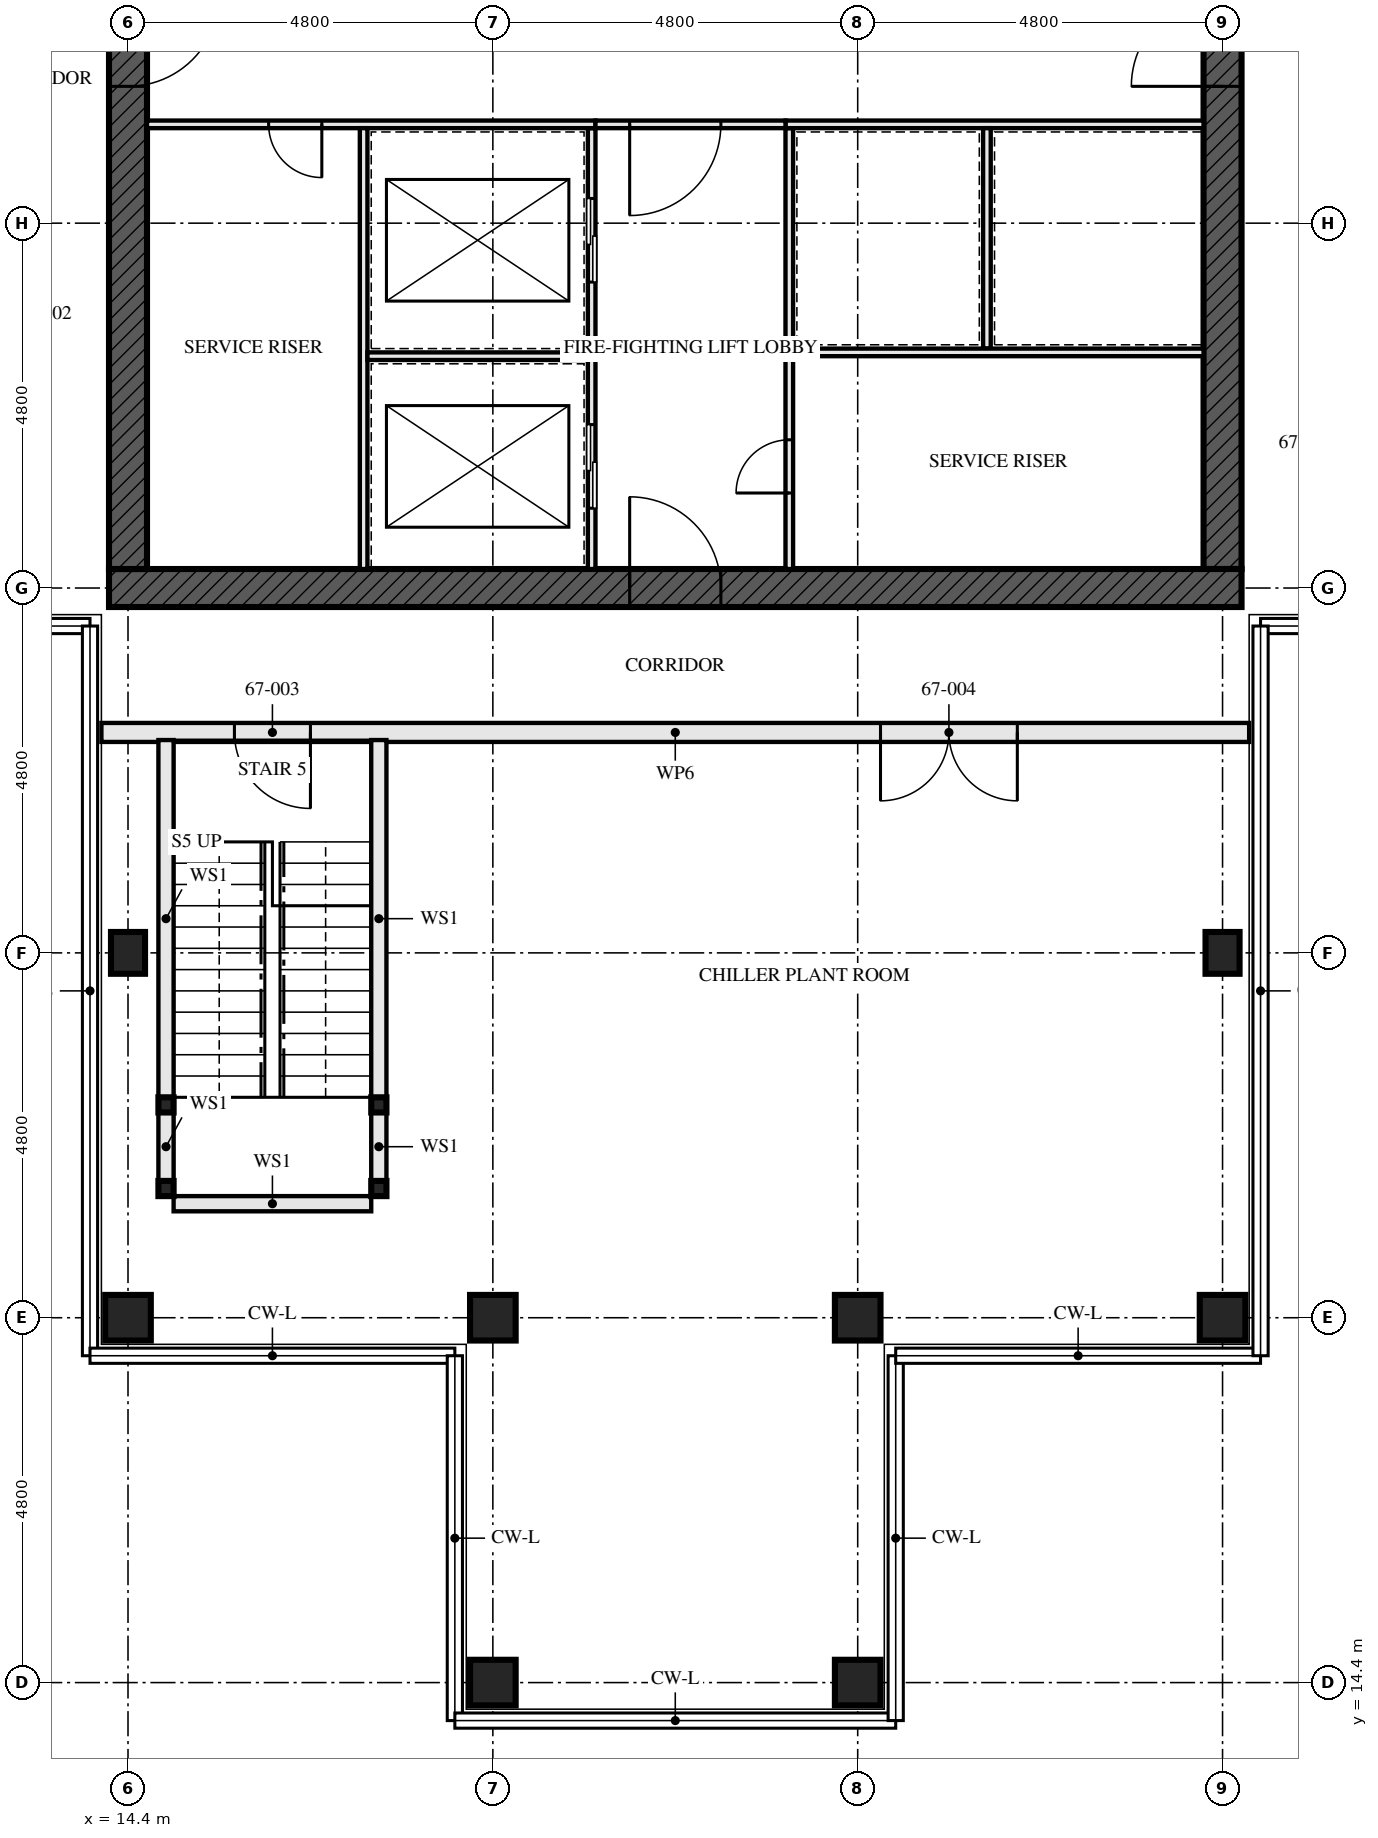
"""IFC4 building model, lengths in metres.
Left out: names, types, materials, properties, quantities, classifications, styles, units other than length and angle.
Written with IfcOpenShell. Run it as: python <this file> out.ifc"""

import sys

from ifc_helpers import new_model, si_unit, direction, frame, frame_2d, origin, origin_2d, place, context, subcontext, project, spatial, rectangle, hollow_rectangle, i_section, extrude, element, fill, save


model = new_model("IFC4")
c1 = context("Model", 3, precision=1e-05, world=origin(), true_north=direction((0.0, 1.0)))
c2 = subcontext(c1, "Body", "Model", "MODEL_VIEW")
j1 = project(units=[si_unit("LENGTHUNIT", "METRE"), si_unit("PLANEANGLEUNIT", "RADIAN")], contexts=[c1])
p1 = place(None, origin())
s1 = spatial("IfcSite", under=j1, at=p1, CompositionType="ELEMENT")
p2 = place(p1, origin())
s2 = spatial("IfcBuilding", under=s1, at=p2, CompositionType="ELEMENT")
p3 = place(p2, frame((0.0, 0.0, 243.5)))
s3 = spatial("IfcBuildingStorey", under=s2, at=p3, CompositionType="ELEMENT", Elevation=243.5)
p4 = place(p3, frame((14.4, 19.2, 0.0), z_axis=(0.0, 0.0, 1.0), x_axis=(0.0, 1.0, 0.0)))
e1 = element("IfcColumn", 1, at=p4, inside=s3, PredefinedType="COLUMN", context=c2, shape_type="SweptSolid", body=[
    extrude(hollow_rectangle(XDim=0.6, YDim=0.6, WallThickness=0.05, at=origin_2d()), origin(), (0.0, 0.0, 1.0), 4.5),
])
p5 = place(p3, frame((14.4, 24.0, 0.0), z_axis=(0.0, 0.0, 1.0), x_axis=(1.0, 0.0, 0.0)))
e2 = element("IfcColumn", 2, at=p5, inside=s3, PredefinedType="COLUMN", context=c2, shape_type="SweptSolid", body=[
    extrude(i_section(OverallWidth=0.448, OverallDepth=0.55, WebThickness=0.072, FlangeThickness=0.115, FilletRadius=0.015, at=origin_2d()), origin(), (0.0, 0.0, 1.0), 4.5),
])
for number, where, z_axis, x_axis in (
    (3, (19.2, 14.4, 0.0), (0.0, 0.0, 1.0), (0.0, 1.0, 0.0)),
    (4, (19.2, 19.2, 0.0), (0.0, 0.0, 1.0), (0.0, 1.0, 0.0)),
    (5, (24.0, 14.4, 0.0), (0.0, 0.0, 1.0), (0.0, 1.0, 0.0)),
    (6, (24.0, 19.2, 0.0), (0.0, 0.0, 1.0), (0.0, 1.0, 0.0)),
    (7, (28.8, 19.2, 0.0), (0.0, 0.0, 1.0), (0.0, 1.0, 0.0)),
):
    element("IfcColumn", number, at=place(p3, frame(where, z_axis=z_axis, x_axis=x_axis)), inside=s3, PredefinedType="COLUMN", context=c2, shape_type="SweptSolid", body=[
        extrude(hollow_rectangle(XDim=0.6, YDim=0.6, WallThickness=0.05, at=origin_2d()), origin(), (0.0, 0.0, 1.0), 4.5),
    ])
p6 = place(p3, frame((28.8, 24.0, 0.0), z_axis=(0.0, 0.0, 1.0), x_axis=(1.0, 0.0, 0.0)))
e8 = element("IfcColumn", 8, at=p6, inside=s3, PredefinedType="COLUMN", context=c2, shape_type="SweptSolid", body=[
    extrude(i_section(OverallWidth=0.448, OverallDepth=0.55, WebThickness=0.072, FlangeThickness=0.115, FilletRadius=0.015, at=origin_2d()), origin(), (0.0, 0.0, 1.0), 4.5),
])
p7 = place(p3, frame((14.15, 28.8, -0.25), z_axis=(0.0, 0.0, 1.0), x_axis=(1.0, 0.0, 0.0)))
e9 = element("IfcWall", 9, at=p7, inside=s3, PredefinedType="SHEAR", context=c2, shape_type="SweptSolid", body=[
    extrude(rectangle(XDim=14.9, YDim=0.5, at=frame_2d((7.45, 0.0))), origin(), (0.0, 0.0, 1.0), 4.5),
])
p8 = place(p7, frame((6.85, 0.0, 0.25)))
e10 = element("IfcOpeningElement", 10, at=p8, cuts=e9, PredefinedType="OPENING", context=c2, shape_type="SweptSolid", body=[
    extrude(rectangle(XDim=1.2, YDim=2.1, at=frame_2d((0.6, 1.05))), frame((0.0, 0.26, 0.0), z_axis=(0.0, -1.0, 0.0), x_axis=(1.0, 0.0, 0.0)), (0.0, 0.0, 1.0), 0.521),
])
p9 = place(p3, frame((14.4, 42.95, -0.25), z_axis=(0.0, 0.0, 1.0), x_axis=(0.0, -1.0, 0.0)))
e11 = element("IfcWall", 11, at=p9, inside=s3, PredefinedType="SHEAR", context=c2, shape_type="SweptSolid", body=[
    extrude(rectangle(XDim=13.9, YDim=0.5, at=frame_2d((6.95, 0.0))), origin(), (0.0, 0.0, 1.0), 4.5),
])
p10 = place(p9, frame((6.35, 0.0, 0.25)))
e12 = element("IfcOpeningElement", 12, at=p10, cuts=e11, PredefinedType="OPENING", context=c2, shape_type="SweptSolid", body=[
    extrude(rectangle(XDim=1.2, YDim=2.1, at=frame_2d((0.6, 1.05))), frame((0.0, 0.26, 0.0), z_axis=(0.0, -1.0, 0.0), x_axis=(1.0, 0.0, 0.0)), (0.0, 0.0, 1.0), 0.521),
])
p11 = place(p3, frame((28.8, 29.05, -0.25), z_axis=(0.0, 0.0, 1.0), x_axis=(0.0, 1.0, 0.0)))
e13 = element("IfcWall", 13, at=p11, inside=s3, PredefinedType="SHEAR", context=c2, shape_type="SweptSolid", body=[
    extrude(rectangle(XDim=13.9, YDim=0.5, at=frame_2d((6.95, 0.0))), origin(), (0.0, 0.0, 1.0), 4.5),
])
p12 = place(p11, frame((6.35, 0.0, 0.25)))
e14 = element("IfcOpeningElement", 14, at=p12, cuts=e13, PredefinedType="OPENING", context=c2, shape_type="SweptSolid", body=[
    extrude(rectangle(XDim=1.2, YDim=2.1, at=frame_2d((0.6, 1.05))), frame((0.0, 0.26, 0.0), z_axis=(0.0, -1.0, 0.0), x_axis=(1.0, 0.0, 0.0)), (0.0, 0.0, 1.0), 0.521),
])
for number, where, z_axis, x_axis in (
    (15, (14.9, 20.9, 0.0), (0.0, 0.0, 1.0), (1.0, 0.0, 0.0)),
    (16, (17.7, 20.9, 0.0), (0.0, 0.0, 1.0), (1.0, 0.0, 0.0)),
    (17, (14.9, 22.0, 0.0), (0.0, 0.0, 1.0), (1.0, 0.0, 0.0)),
    (18, (17.7, 22.0, 0.0), (0.0, 0.0, 1.0), (1.0, 0.0, 0.0)),
):
    element("IfcColumn", number, at=place(p3, frame(where, z_axis=z_axis, x_axis=x_axis)), inside=s3, PredefinedType="COLUMN", context=c2, shape_type="SweptSolid", body=[
        extrude(hollow_rectangle(XDim=0.2, YDim=0.2, WallThickness=0.008, at=origin_2d()), origin(), (0.0, 0.0, 1.0), 4.25),
    ])
p13 = place(p3, frame((14.9, 21.0, 0.0), z_axis=(0.0, 0.0, 1.0), x_axis=(0.0, 1.0, 0.0)))
e19 = element("IfcWall", 19, at=p13, inside=s3, PredefinedType="SOLIDWALL", context=c2, shape_type="SweptSolid", body=[
    extrude(rectangle(XDim=0.9, YDim=0.2, at=frame_2d((0.45, 0.0))), origin(), (0.0, 0.0, 1.0), 4.25),
])
p14 = place(p3, frame((14.9, 22.1, 0.0), z_axis=(0.0, 0.0, 1.0), x_axis=(0.0, 1.0, 0.0)))
e20 = element("IfcWall", 20, at=p14, inside=s3, PredefinedType="SOLIDWALL", context=c2, shape_type="SweptSolid", body=[
    extrude(rectangle(XDim=4.7, YDim=0.2, at=frame_2d((2.35, 0.0))), origin(), (0.0, 0.0, 1.0), 4.25),
])
p15 = place(p3, frame((17.7, 21.0, 0.0), z_axis=(0.0, 0.0, 1.0), x_axis=(0.0, 1.0, 0.0)))
e21 = element("IfcWall", 21, at=p15, inside=s3, PredefinedType="SOLIDWALL", context=c2, shape_type="SweptSolid", body=[
    extrude(rectangle(XDim=0.9, YDim=0.2, at=frame_2d((0.45, 0.0))), origin(), (0.0, 0.0, 1.0), 4.25),
])
p16 = place(p3, frame((17.7, 22.1, 0.0), z_axis=(0.0, 0.0, 1.0), x_axis=(0.0, 1.0, 0.0)))
e22 = element("IfcWall", 22, at=p16, inside=s3, PredefinedType="SOLIDWALL", context=c2, shape_type="SweptSolid", body=[
    extrude(rectangle(XDim=4.7, YDim=0.2, at=frame_2d((2.35, 0.0))), origin(), (0.0, 0.0, 1.0), 4.25),
])
p17 = place(p3, frame((15.0, 20.7, 0.0), z_axis=(0.0, 0.0, 1.0), x_axis=(1.0, 0.0, 0.0)))
e23 = element("IfcWall", 23, at=p17, inside=s3, PredefinedType="SOLIDWALL", context=c2, shape_type="SweptSolid", body=[
    extrude(rectangle(XDim=2.6, YDim=0.2, at=frame_2d((1.3, 0.0))), origin(), (0.0, 0.0, 1.0), 4.25),
])
p18 = place(p3, frame((14.05, 26.9, 0.0), z_axis=(0.0, 0.0, 1.0), x_axis=(1.0, 0.0, 0.0)))
e24 = element("IfcWall", 24, at=p18, inside=s3, PredefinedType="SOLIDWALL", context=c2, shape_type="SweptSolid", body=[
    extrude(rectangle(XDim=15.1, YDim=0.25, at=frame_2d((7.55, 0.0))), origin(), (0.0, 0.0, 1.0), 3.04),
])
p19 = place(p18, frame((1.75, 0.0, 0.0)))
e25 = element("IfcOpeningElement", 25, at=p19, cuts=e24, PredefinedType="OPENING", context=c2, shape_type="SweptSolid", body=[
    extrude(rectangle(XDim=1.0, YDim=2.1, at=frame_2d((0.5, 1.05))), frame((0.0, 0.135, 0.0), z_axis=(0.0, -1.0, 0.0), x_axis=(1.0, 0.0, 0.0)), (0.0, 0.0, 1.0), 0.271),
])
p20 = place(p18, frame((10.25, 0.0, 0.0)))
e26 = element("IfcOpeningElement", 26, at=p20, cuts=e24, PredefinedType="OPENING", context=c2, shape_type="SweptSolid", body=[
    extrude(rectangle(XDim=1.8, YDim=2.4, at=frame_2d((0.9, 1.2))), frame((0.0, 0.135, 0.0), z_axis=(0.0, -1.0, 0.0), x_axis=(1.0, 0.0, 0.0)), (0.0, 0.0, 1.0), 0.271),
])
p21 = place(p3, frame((20.5, 29.05, 0.0), z_axis=(0.0, 0.0, 1.0), x_axis=(0.0, 1.0, 0.0)))
e27 = element("IfcWall", 27, at=p21, inside=s3, PredefinedType="SOLIDWALL", context=c2, shape_type="SweptSolid", body=[
    extrude(rectangle(XDim=5.8, YDim=0.1, at=frame_2d((2.9, 0.0))), origin(), (0.0, 0.0, 1.0), 4.25),
])
p22 = place(p21, frame((0.8, 0.0, 0.0)))
e28 = element("IfcOpeningElement", 28, at=p22, cuts=e27, PredefinedType="OPENING", context=c2, shape_type="SweptSolid", body=[
    extrude(rectangle(XDim=1.1, YDim=2.3, at=frame_2d((0.55, 1.15))), frame((0.0, 0.061, 0.0), z_axis=(0.0, -1.0, 0.0), x_axis=(1.0, 0.0, 0.0)), (0.0, 0.0, 1.0), 0.121),
])
p23 = place(p21, frame((3.775, 0.0, 0.0)))
e29 = element("IfcOpeningElement", 29, at=p23, cuts=e27, PredefinedType="OPENING", context=c2, shape_type="SweptSolid", body=[
    extrude(rectangle(XDim=1.1, YDim=2.3, at=frame_2d((0.55, 1.15))), frame((0.0, 0.061, 0.0), z_axis=(0.0, -1.0, 0.0), x_axis=(1.0, 0.0, 0.0)), (0.0, 0.0, 1.0), 0.121),
])
p24 = place(p3, frame((23.1, 29.05, 0.0), z_axis=(0.0, 0.0, 1.0), x_axis=(0.0, 1.0, 0.0)))
e30 = element("IfcWall", 30, at=p24, inside=s3, PredefinedType="SOLIDWALL", context=c2, shape_type="SweptSolid", body=[
    extrude(rectangle(XDim=5.8, YDim=0.1, at=frame_2d((2.9, 0.0))), origin(), (0.0, 0.0, 1.0), 4.25),
])
p25 = place(p24, frame((1.0, 0.0, 0.0)))
e31 = element("IfcOpeningElement", 31, at=p25, cuts=e30, PredefinedType="OPENING", context=c2, shape_type="SweptSolid", body=[
    extrude(rectangle(XDim=0.7, YDim=2.1, at=frame_2d((0.35, 1.05))), frame((0.0, 0.061, 0.0), z_axis=(0.0, -1.0, 0.0), x_axis=(1.0, 0.0, 0.0)), (0.0, 0.0, 1.0), 0.121),
])
p26 = place(p3, frame((14.65, 34.9, 0.0), z_axis=(0.0, 0.0, 1.0), x_axis=(1.0, 0.0, 0.0)))
e32 = element("IfcWall", 32, at=p26, inside=s3, PredefinedType="SOLIDWALL", context=c2, shape_type="SweptSolid", body=[
    extrude(rectangle(XDim=5.9, YDim=0.1, at=frame_2d((2.95, 0.0))), origin(), (0.0, 0.0, 1.0), 4.25),
])
p27 = place(p26, frame((1.6, 0.0, 0.0)))
e33 = element("IfcOpeningElement", 33, at=p27, cuts=e32, PredefinedType="OPENING", context=c2, shape_type="SweptSolid", body=[
    extrude(rectangle(XDim=0.7, YDim=2.1, at=frame_2d((0.35, 1.05))), frame((0.0, 0.061, 0.0), z_axis=(0.0, -1.0, 0.0), x_axis=(1.0, 0.0, 0.0)), (0.0, 0.0, 1.0), 0.121),
])
p28 = place(p3, frame((23.05, 34.9, 0.0), z_axis=(0.0, 0.0, 1.0), x_axis=(1.0, 0.0, 0.0)))
e34 = element("IfcWall", 34, at=p28, inside=s3, PredefinedType="SOLIDWALL", context=c2, shape_type="SweptSolid", body=[
    extrude(rectangle(XDim=5.5, YDim=0.1, at=frame_2d((2.75, 0.0))), origin(), (0.0, 0.0, 1.0), 4.25),
])
p29 = place(p3, frame((20.55, 34.9, 0.0), z_axis=(0.0, 0.0, 1.0), x_axis=(1.0, 0.0, 0.0)))
e35 = element("IfcWall", 35, at=p29, inside=s3, PredefinedType="SOLIDWALL", context=c2, shape_type="SweptSolid", body=[
    extrude(rectangle(XDim=2.5, YDim=0.1, at=frame_2d((1.25, 0.0))), origin(), (0.0, 0.0, 1.0), 4.25),
])
p30 = place(p29, frame((0.45, 0.0, 0.0)))
e36 = element("IfcOpeningElement", 36, at=p30, cuts=e35, PredefinedType="OPENING", context=c2, shape_type="SweptSolid", body=[
    extrude(rectangle(XDim=1.2, YDim=2.1, at=frame_2d((0.6, 1.05))), frame((0.0, 0.061, 0.0), z_axis=(0.0, -1.0, 0.0), x_axis=(1.0, 0.0, 0.0)), (0.0, 0.0, 1.0), 0.121),
])
p31 = place(p3, frame((17.5, 29.05, 0.0), z_axis=(0.0, 0.0, 1.0), x_axis=(0.0, 1.0, 0.0)))
e37 = element("IfcWall", 37, at=p31, inside=s3, PredefinedType="SOLIDWALL", context=c2, shape_type="SweptSolid", body=[
    extrude(rectangle(XDim=5.8, YDim=0.1, at=frame_2d((2.9, 0.0))), origin(), (0.0, 0.0, 1.0), 4.25),
])
p32 = place(p3, frame((17.55, 31.85, 0.0), z_axis=(0.0, 0.0, 1.0), x_axis=(1.0, 0.0, 0.0)))
e38 = element("IfcWall", 38, at=p32, inside=s3, PredefinedType="SOLIDWALL", context=c2, shape_type="SweptSolid", body=[
    extrude(rectangle(XDim=2.9, YDim=0.1, at=frame_2d((1.45, 0.0))), origin(), (0.0, 0.0, 1.0), 4.25),
])
p33 = place(p3, frame((25.7, 31.95, 0.0), z_axis=(0.0, 0.0, 1.0), x_axis=(0.0, 1.0, 0.0)))
e39 = element("IfcWall", 39, at=p33, inside=s3, PredefinedType="SOLIDWALL", context=c2, shape_type="SweptSolid", body=[
    extrude(rectangle(XDim=2.9, YDim=0.1, at=frame_2d((1.45, 0.0))), origin(), (0.0, 0.0, 1.0), 4.25),
])
p34 = place(p3, frame((23.15, 31.9, 0.0), z_axis=(0.0, 0.0, 1.0), x_axis=(1.0, 0.0, 0.0)))
e40 = element("IfcWall", 40, at=p34, inside=s3, PredefinedType="SOLIDWALL", context=c2, shape_type="SweptSolid", body=[
    extrude(rectangle(XDim=5.4, YDim=0.1, at=frame_2d((2.7, 0.0))), origin(), (0.0, 0.0, 1.0), 4.25),
])
p35 = place(p19, frame((1.0, 0.0, 0.0), z_axis=(0.0, 0.0, 1.0), x_axis=(-1.0, 0.0, 0.0)))
e41 = element("IfcDoor", 41, at=p35, inside=s3, OperationType="SINGLE_SWING_RIGHT", PredefinedType="DOOR", context=c2, shape_type="SweptSolid", body=[
    extrude(rectangle(XDim=1.0, YDim=2.1, at=frame_2d((0.5, 1.05))), frame((0.0, 0.032, 0.0), z_axis=(0.0, -1.0, 0.0), x_axis=(1.0, 0.0, 0.0)), (0.0, 0.0, 1.0), 0.064),
])
fill(e25, e41)
p36 = place(p20, frame((1.8, 0.0, 0.0), z_axis=(0.0, 0.0, 1.0), x_axis=(-1.0, 0.0, 0.0)))
e42 = element("IfcDoor", 42, at=p36, inside=s3, OperationType="DOUBLE_DOOR_SINGLE_SWING", PredefinedType="DOOR", context=c2, shape_type="SweptSolid", body=[
    extrude(rectangle(XDim=1.8, YDim=2.4, at=frame_2d((0.9, 1.2))), frame((0.0, 0.032, 0.0), z_axis=(0.0, -1.0, 0.0), x_axis=(1.0, 0.0, 0.0)), (0.0, 0.0, 1.0), 0.064),
])
fill(e26, e42)
p37 = place(p22, origin())
e43 = element("IfcDoor", 43, at=p37, inside=s3, OperationType="SLIDING_TO_LEFT", PredefinedType="DOOR", context=c2, shape_type="SweptSolid", body=[
    extrude(rectangle(XDim=1.1, YDim=2.3, at=frame_2d((0.55, 1.15))), frame((0.0, 0.05, 0.0), z_axis=(0.0, -1.0, 0.0), x_axis=(1.0, 0.0, 0.0)), (0.0, 0.0, 1.0), 0.1),
])
fill(e28, e43)
p38 = place(p23, origin())
e44 = element("IfcDoor", 44, at=p38, inside=s3, OperationType="SLIDING_TO_LEFT", PredefinedType="DOOR", context=c2, shape_type="SweptSolid", body=[
    extrude(rectangle(XDim=1.1, YDim=2.3, at=frame_2d((0.55, 1.15))), frame((0.0, 0.05, 0.0), z_axis=(0.0, -1.0, 0.0), x_axis=(1.0, 0.0, 0.0)), (0.0, 0.0, 1.0), 0.1),
])
fill(e29, e44)
p39 = place(p25, origin())
e45 = element("IfcDoor", 45, at=p39, inside=s3, OperationType="SINGLE_SWING_RIGHT", PredefinedType="DOOR", context=c2, shape_type="SweptSolid", body=[
    extrude(rectangle(XDim=0.7, YDim=2.1, at=frame_2d((0.35, 1.05))), frame((0.0, 0.027, 0.0), z_axis=(0.0, -1.0, 0.0), x_axis=(1.0, 0.0, 0.0)), (0.0, 0.0, 1.0), 0.054),
])
fill(e31, e45)
p40 = place(p27, frame((0.7, 0.0, 0.0), z_axis=(0.0, 0.0, 1.0), x_axis=(-1.0, 0.0, 0.0)))
e46 = element("IfcDoor", 46, at=p40, inside=s3, OperationType="SINGLE_SWING_RIGHT", PredefinedType="DOOR", context=c2, shape_type="SweptSolid", body=[
    extrude(rectangle(XDim=0.7, YDim=2.1, at=frame_2d((0.35, 1.05))), frame((0.0, 0.027, 0.0), z_axis=(0.0, -1.0, 0.0), x_axis=(1.0, 0.0, 0.0)), (0.0, 0.0, 1.0), 0.054),
])
fill(e33, e46)
p41 = place(p30, frame((1.2, 0.0, 0.0), z_axis=(0.0, 0.0, 1.0), x_axis=(-1.0, 0.0, 0.0)))
e47 = element("IfcDoor", 47, at=p41, inside=s3, OperationType="SINGLE_SWING_LEFT", PredefinedType="DOOR", context=c2, shape_type="SweptSolid", body=[
    extrude(rectangle(XDim=1.2, YDim=2.1, at=frame_2d((0.6, 1.05))), frame((0.0, 0.027, 0.0), z_axis=(0.0, -1.0, 0.0), x_axis=(1.0, 0.0, 0.0)), (0.0, 0.0, 1.0), 0.054),
])
fill(e36, e47)
p42 = place(p8, origin())
e48 = element("IfcDoor", 48, at=p42, inside=s3, OperationType="SINGLE_SWING_LEFT", PredefinedType="DOOR", context=c2, shape_type="SweptSolid", body=[
    extrude(rectangle(XDim=1.2, YDim=2.1, at=frame_2d((0.6, 1.05))), frame((0.0, 0.027, 0.0), z_axis=(0.0, -1.0, 0.0), x_axis=(1.0, 0.0, 0.0)), (0.0, 0.0, 1.0), 0.054),
])
fill(e10, e48)
p43 = place(p10, origin())
e49 = element("IfcDoor", 49, at=p43, inside=s3, OperationType="SINGLE_SWING_LEFT", PredefinedType="DOOR", context=c2, shape_type="SweptSolid", body=[
    extrude(rectangle(XDim=1.2, YDim=2.1, at=frame_2d((0.6, 1.05))), frame((0.0, 0.027, 0.0), z_axis=(0.0, -1.0, 0.0), x_axis=(1.0, 0.0, 0.0)), (0.0, 0.0, 1.0), 0.054),
])
fill(e12, e49)
p44 = place(p12, origin())
e50 = element("IfcDoor", 50, at=p44, inside=s3, OperationType="SINGLE_SWING_LEFT", PredefinedType="DOOR", context=c2, shape_type="SweptSolid", body=[
    extrude(rectangle(XDim=1.2, YDim=2.1, at=frame_2d((0.6, 1.05))), frame((0.0, 0.027, 0.0), z_axis=(0.0, -1.0, 0.0), x_axis=(1.0, 0.0, 0.0)), (0.0, 0.0, 1.0), 0.054),
])
fill(e14, e50)
save(model, sys.argv[1])
